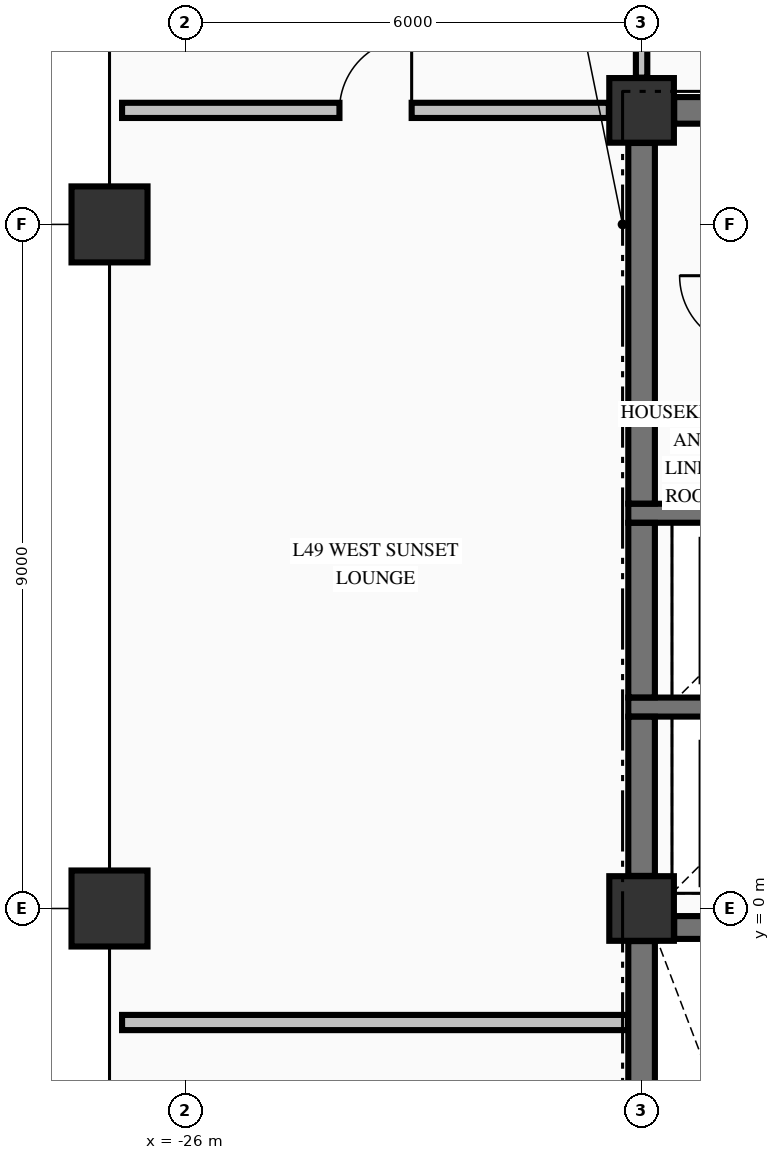
"""IFC4 building model, lengths in metres.
Left out: names, types, materials, properties, quantities, classifications, styles, units other than length and angle.
Written with IfcOpenShell. Run it as: python <this file> out.ifc"""

import sys

from ifc_helpers import new_model, si_unit, direction, frame, frame_2d, origin, origin_2d, place, context, subcontext, project, spatial, rectangle, extrude, element, fill, save


model = new_model("IFC4")
c1 = context("Model", 3, precision=1e-05, world=origin(), true_north=direction((0.0, 1.0)))
c2 = subcontext(c1, "Body", "Model", "MODEL_VIEW")
j1 = project(units=[si_unit("LENGTHUNIT", "METRE"), si_unit("PLANEANGLEUNIT", "RADIAN")], contexts=[c1])
p1 = place(None, origin())
s1 = spatial("IfcSite", under=j1, at=p1, CompositionType="ELEMENT")
p2 = place(p1, origin())
s2 = spatial("IfcBuilding", under=s1, at=p2, CompositionType="ELEMENT")
p3 = place(p2, frame((0.0, 0.0, 191.46)))
s3 = spatial("IfcBuildingStorey", under=s2, at=p3, CompositionType="ELEMENT", Elevation=191.46)
for number, where, z_axis, x_axis in (
    (1, (-27.0, 0.0, -0.425), (0.0, 0.0, 1.0), (1.0, 0.0, 0.0)),
    (2, (-27.0, 9.0, -0.425), (0.0, 0.0, 1.0), (1.0, 0.0, 0.0)),
):
    element("IfcColumn", number, at=place(p3, frame(where, z_axis=z_axis, x_axis=x_axis)), inside=s3, PredefinedType="COLUMN", context=c2, shape_type="SweptSolid", body=[
        extrude(rectangle(XDim=1.0, YDim=1.0, at=origin_2d()), origin(), (0.0, 0.0, 1.0), 3.55),
    ])
for number, where, z_axis, x_axis in (
    (3, (-20.0, 10.5, -0.425), (0.0, 0.0, 1.0), (1.0, 0.0, 0.0)),
    (4, (-20.0, 0.0, -0.425), (0.0, 0.0, 1.0), (1.0, 0.0, 0.0)),
):
    element("IfcColumn", number, at=place(p3, frame(where, z_axis=z_axis, x_axis=x_axis)), inside=s3, PredefinedType="COLUMN", context=c2, shape_type="SweptSolid", body=[
        extrude(rectangle(XDim=0.85, YDim=0.85, at=origin_2d()), origin(), (0.0, 0.0, 1.0), 3.55),
    ])
p4 = place(p3, frame((-19.571, -0.25, 0.0), z_axis=(0.0, 0.0, 1.0), x_axis=(1.0, 0.0, 0.0)))
e5 = element("IfcWall", 5, at=p4, inside=s3, PredefinedType="SHEAR", context=c2, shape_type="SweptSolid", body=[
    extrude(rectangle(XDim=8.142, YDim=0.3, at=frame_2d((4.071, 0.0))), origin(), (0.0, 0.0, 1.0), 3.125),
])
p5 = place(p4, frame((5.871, 0.0, 0.0)))
e6 = element("IfcOpeningElement", 6, at=p5, cuts=e5, PredefinedType="OPENING", context=c2, shape_type="SweptSolid", body=[
    extrude(rectangle(XDim=1.1, YDim=2.15, at=frame_2d((0.55, 1.075))), frame((0.0, 0.16, 0.0), z_axis=(0.0, -1.0, 0.0), x_axis=(1.0, 0.0, 0.0)), (0.0, 0.0, 1.0), 0.32),
])
for number, where, z_axis, x_axis in (
    (7, (-20.175, 2.65, 0.0), (0.0, 0.0, 1.0), (1.0, 0.0, 0.0)),
    (8, (-20.175, 5.2, 0.0), (0.0, 0.0, 1.0), (1.0, 0.0, 0.0)),
):
    element("IfcWall", number, at=place(p3, frame(where, z_axis=z_axis, x_axis=x_axis)), inside=s3, PredefinedType="SOLIDWALL", context=c2, shape_type="SweptSolid", body=[
        extrude(rectangle(XDim=3.2, YDim=0.25, at=frame_2d((1.6, 0.0))), origin(), (0.0, 0.0, 1.0), 3.125),
    ])
p6 = place(p3, frame((-19.571, 10.5, 0.0), z_axis=(0.0, 0.0, 1.0), x_axis=(1.0, 0.0, 0.0)))
e9 = element("IfcWall", 9, at=p6, inside=s3, PredefinedType="SHEAR", context=c2, shape_type="SweptSolid", body=[
    extrude(rectangle(XDim=4.871, YDim=0.35, at=frame_2d((2.436, 0.0))), origin(), (0.0, 0.0, 1.0), 3.125),
])
p7 = place(p6, frame((3.121, 0.0, 0.0)))
e10 = element("IfcOpeningElement", 10, at=p7, cuts=e9, PredefinedType="OPENING", context=c2, shape_type="SweptSolid", body=[
    extrude(rectangle(XDim=1.1, YDim=2.15, at=frame_2d((0.55, 1.075))), frame((0.0, 0.185, 0.0), z_axis=(0.0, -1.0, 0.0), x_axis=(1.0, 0.0, 0.0)), (0.0, 0.0, 1.0), 0.37),
])
p8 = place(p6, frame((1.276, 0.0, 0.0)))
e11 = element("IfcOpeningElement", 11, at=p8, cuts=e9, PredefinedType="OPENING", context=c2, shape_type="SweptSolid", body=[
    extrude(rectangle(XDim=0.95, YDim=2.15, at=frame_2d((0.475, 1.075))), frame((0.0, 0.185, 0.0), z_axis=(0.0, -1.0, 0.0), x_axis=(1.0, 0.0, 0.0)), (0.0, 0.0, 1.0), 0.37),
])
p9 = place(p3, frame((-26.835, -1.5, 0.0), z_axis=(0.0, 0.0, 1.0), x_axis=(1.0, 0.0, 0.0)))
e12 = element("IfcWall", 12, at=p9, inside=s3, PredefinedType="PARTITIONING", context=c2, shape_type="SweptSolid", body=[
    extrude(rectangle(XDim=6.657, YDim=0.2, at=frame_2d((3.329, 0.0))), origin(), (0.0, 0.0, 1.0), 3.125),
])
p10 = place(p3, frame((-26.835, 10.5, 0.0), z_axis=(0.0, 0.0, 1.0), x_axis=(1.0, 0.0, 0.0)))
e13 = element("IfcWall", 13, at=p10, inside=s3, PredefinedType="PARTITIONING", context=c2, shape_type="SweptSolid", body=[
    extrude(rectangle(XDim=6.404, YDim=0.2, at=frame_2d((3.202, 0.0))), origin(), (0.0, 0.0, 1.0), 3.125),
])
p11 = place(p10, frame((2.86, 0.0, 0.0)))
e14 = element("IfcOpeningElement", 14, at=p11, cuts=e13, PredefinedType="OPENING", context=c2, shape_type="SweptSolid", body=[
    extrude(rectangle(XDim=0.95, YDim=2.15, at=frame_2d((0.475, 1.075))), frame((0.0, 0.11, 0.0), z_axis=(0.0, -1.0, 0.0), x_axis=(1.0, 0.0, 0.0)), (0.0, 0.0, 1.0), 0.22),
])
p12 = place(p3, frame((-20.0, -9.521, 0.0), z_axis=(0.0, 0.0, 1.0), x_axis=(0.0, 1.0, 0.0)))
e15 = element("IfcWall", 15, at=p12, inside=s3, PredefinedType="SHEAR", context=c2, shape_type="SweptSolid", body=[
    extrude(rectangle(XDim=9.092, YDim=0.35, at=frame_2d((4.546, 0.0))), origin(), (0.0, 0.0, 1.0), 3.125),
])
p13 = place(p3, frame((-20.0, 0.429, 0.0), z_axis=(0.0, 0.0, 1.0), x_axis=(0.0, 1.0, 0.0)))
e16 = element("IfcWall", 16, at=p13, inside=s3, PredefinedType="SHEAR", context=c2, shape_type="SweptSolid", body=[
    extrude(rectangle(XDim=2.094, YDim=0.35, at=frame_2d((1.047, 0.0))), origin(), (0.0, 0.0, 1.0), 3.125),
])
p14 = place(p3, frame((-20.0, 2.777, 0.0), z_axis=(0.0, 0.0, 1.0), x_axis=(0.0, 1.0, 0.0)))
e17 = element("IfcWall", 17, at=p14, inside=s3, PredefinedType="SHEAR", context=c2, shape_type="SweptSolid", body=[
    extrude(rectangle(XDim=2.296, YDim=0.35, at=frame_2d((1.148, 0.0))), origin(), (0.0, 0.0, 1.0), 3.125),
])
p15 = place(p3, frame((-20.0, 5.327, 0.0), z_axis=(0.0, 0.0, 1.0), x_axis=(0.0, 1.0, 0.0)))
e18 = element("IfcWall", 18, at=p15, inside=s3, PredefinedType="SHEAR", context=c2, shape_type="SweptSolid", body=[
    extrude(rectangle(XDim=4.744, YDim=0.35, at=frame_2d((2.372, 0.0))), origin(), (0.0, 0.0, 1.0), 3.125),
])
p16 = place(p3, frame((-20.0, 10.931, 0.0), z_axis=(0.0, 0.0, 1.0), x_axis=(0.0, 1.0, 0.0)))
e19 = element("IfcWall", 19, at=p16, inside=s3, PredefinedType="PARTITIONING", context=c2, shape_type="SweptSolid", body=[
    extrude(rectangle(XDim=2.766, YDim=0.15, at=frame_2d((1.383, 0.0))), origin(), (0.0, 0.0, 1.0), 2.317),
])
p17 = place(p16, frame((0.744, 0.0, 0.0)))
e20 = element("IfcOpeningElement", 20, at=p17, cuts=e19, PredefinedType="OPENING", context=c2, shape_type="SweptSolid", body=[
    extrude(rectangle(XDim=0.95, YDim=2.15, at=frame_2d((0.475, 1.075))), frame((0.0, 0.085, 0.0), z_axis=(0.0, -1.0, 0.0), x_axis=(1.0, 0.0, 0.0)), (0.0, 0.0, 1.0), 0.17),
])
p18 = place(p11, origin())
e21 = element("IfcDoor", 21, at=p18, inside=s3, OperationType="SINGLE_SWING_RIGHT", PredefinedType="DOOR", context=c2, shape_type="SweptSolid", body=[
    extrude(rectangle(XDim=0.95, YDim=2.15, at=frame_2d((0.475, 1.075))), frame((0.0, 0.025, 0.0), z_axis=(0.0, -1.0, 0.0), x_axis=(1.0, 0.0, 0.0)), (0.0, 0.0, 1.0), 0.05),
])
fill(e14, e21)
save(model, sys.argv[1])
